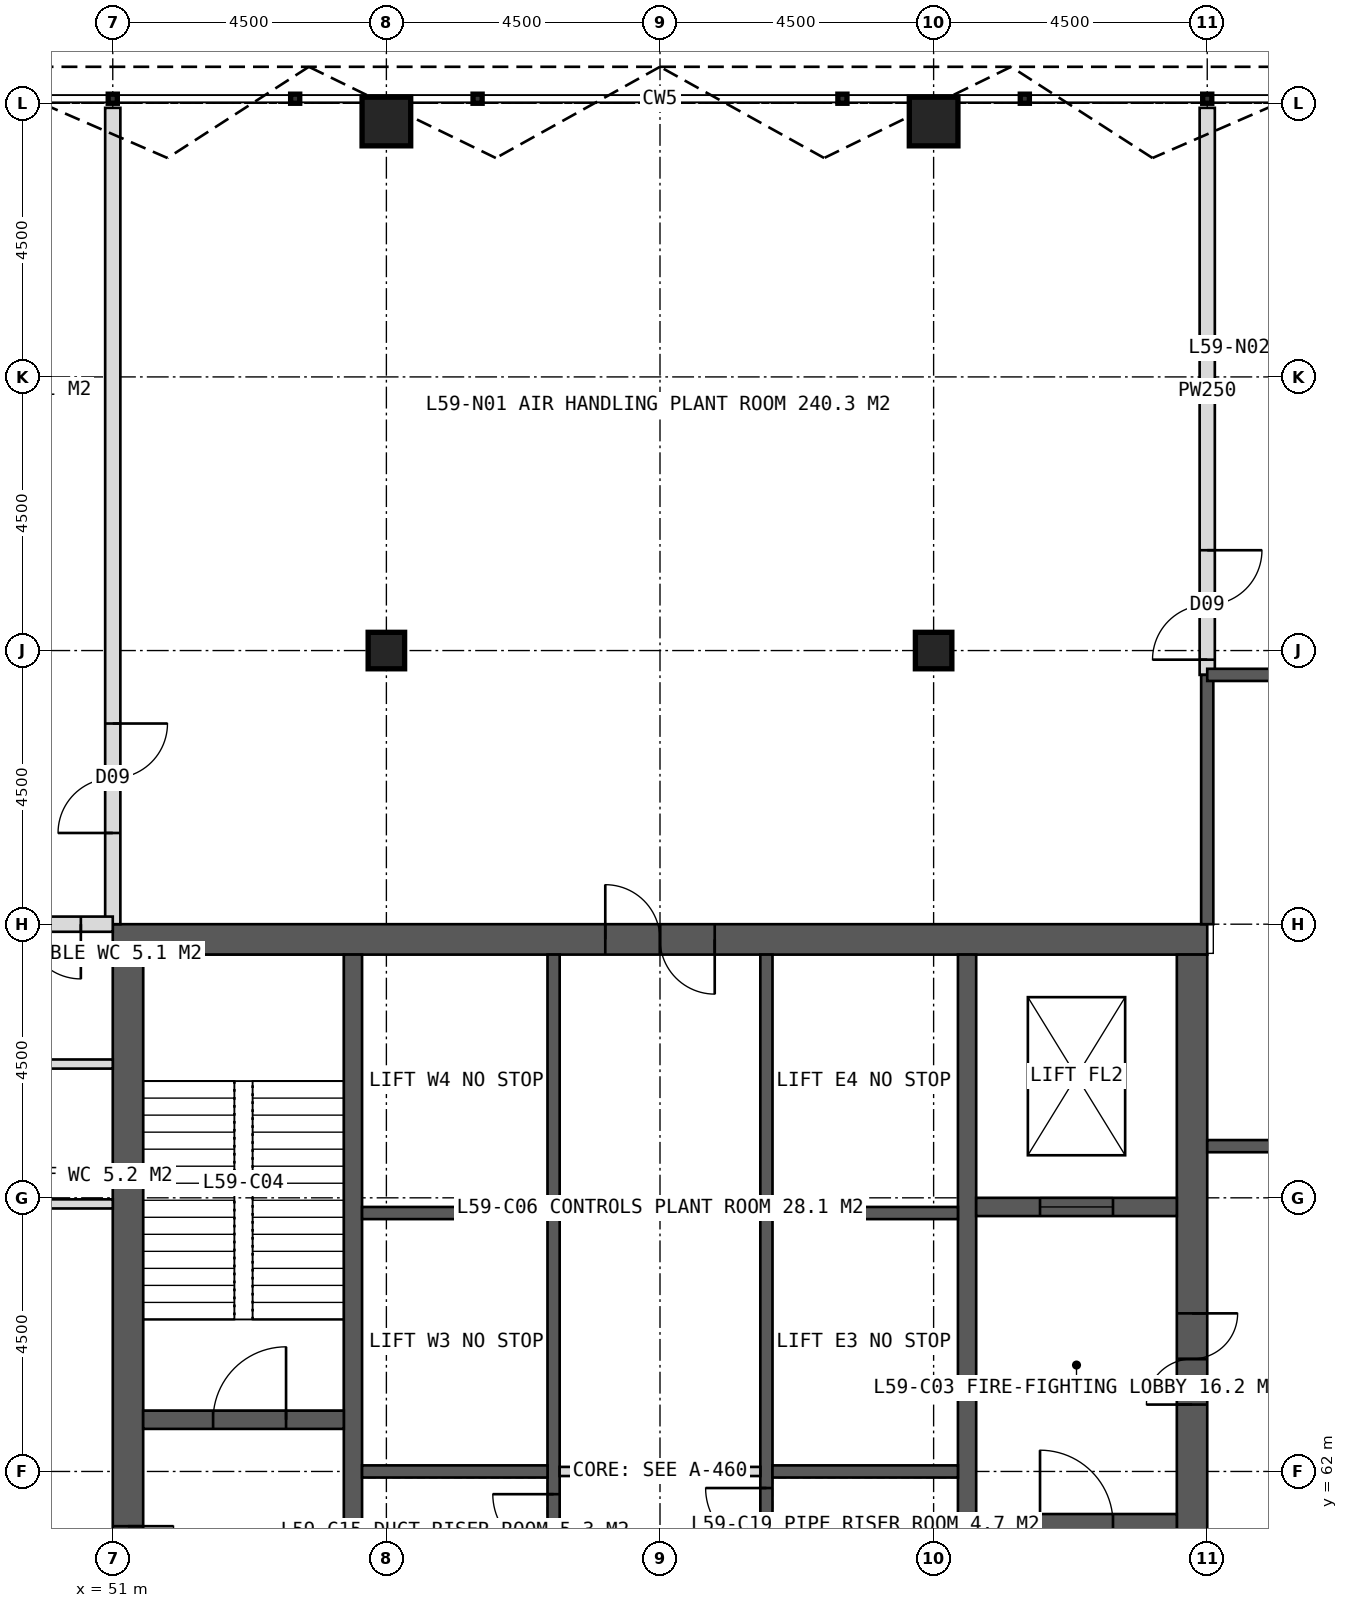
"""IFC4 building model, lengths in metres.
Left out: names, types, materials, properties, quantities, classifications, styles, units other than length and angle.
Written with IfcOpenShell. Run it as: python <this file> out.ifc"""

import sys

from ifc_helpers import new_model, si_unit, direction, frame, frame_2d, origin, origin_2d, place, context, subcontext, project, spatial, rectangle, hollow_rectangle, extrude, element, fill, save


model = new_model("IFC4")
c1 = context("Model", 3, precision=1e-05, world=origin(), true_north=direction((0.0, 1.0)))
c2 = subcontext(c1, "Body", "Model", "MODEL_VIEW")
j1 = project(units=[si_unit("LENGTHUNIT", "METRE"), si_unit("PLANEANGLEUNIT", "RADIAN")], contexts=[c1])
p1 = place(None, origin())
s1 = spatial("IfcSite", under=j1, at=p1, CompositionType="ELEMENT")
p2 = place(p1, origin())
s2 = spatial("IfcBuilding", under=s1, at=p2, CompositionType="ELEMENT")
p3 = place(p2, frame((0.0, 0.0, 245.0)))
s3 = spatial("IfcBuildingStorey", under=s2, at=p3, CompositionType="ELEMENT", Elevation=245.0)
p4 = place(p3, frame((51.0, 70.75, 0.0), z_axis=(0.0, 0.0, 1.0), x_axis=(1.0, 0.0, 0.0)))
e1 = element("IfcWall", 1, at=p4, inside=s3, PredefinedType="SHEAR", context=c2, shape_type="SweptSolid", body=[
    extrude(rectangle(XDim=18.0, YDim=0.5, at=frame_2d((9.0, 0.0))), origin(), (0.0, 0.0, 1.0), 5.0),
])
p5 = place(p4, frame((8.1, 0.0, 0.0)))
e2 = element("IfcOpeningElement", 2, at=p5, cuts=e1, PredefinedType="OPENING", context=c2, shape_type="SweptSolid", body=[
    extrude(rectangle(XDim=1.8, YDim=2.2, at=frame_2d((0.9, 1.1))), frame((0.0, 0.26, 0.0), z_axis=(0.0, -1.0, 0.0), x_axis=(1.0, 0.0, 0.0)), (0.0, 0.0, 1.0), 0.52),
])
p6 = place(p3, frame((51.25, 53.5, 0.0), z_axis=(0.0, 0.0, 1.0), x_axis=(0.0, 1.0, 0.0)))
e3 = element("IfcWall", 3, at=p6, inside=s3, PredefinedType="SHEAR", context=c2, shape_type="SweptSolid", body=[
    extrude(rectangle(XDim=17.0, YDim=0.5, at=frame_2d((8.5, 0.0))), origin(), (0.0, 0.0, 1.0), 5.0),
])
p7 = place(p6, frame((6.1, 0.0, 0.0)))
e4 = element("IfcOpeningElement", 4, at=p7, cuts=e3, PredefinedType="OPENING", context=c2, shape_type="SweptSolid", body=[
    extrude(rectangle(XDim=1.5, YDim=2.2, at=frame_2d((0.75, 1.1))), frame((0.0, 0.26, 0.0), z_axis=(0.0, -1.0, 0.0), x_axis=(1.0, 0.0, 0.0)), (0.0, 0.0, 1.0), 0.52),
])
p8 = place(p3, frame((68.75, 53.5, 0.0), z_axis=(0.0, 0.0, 1.0), x_axis=(0.0, 1.0, 0.0)))
e5 = element("IfcWall", 5, at=p8, inside=s3, PredefinedType="SHEAR", context=c2, shape_type="SweptSolid", body=[
    extrude(rectangle(XDim=17.0, YDim=0.5, at=frame_2d((8.5, 0.0))), origin(), (0.0, 0.0, 1.0), 5.0),
])
p9 = place(p8, frame((9.6, 0.0, 0.0)))
e6 = element("IfcOpeningElement", 6, at=p9, cuts=e5, PredefinedType="OPENING", context=c2, shape_type="SweptSolid", body=[
    extrude(rectangle(XDim=1.5, YDim=2.2, at=frame_2d((0.75, 1.1))), frame((0.0, 0.26, 0.0), z_axis=(0.0, -1.0, 0.0), x_axis=(1.0, 0.0, 0.0)), (0.0, 0.0, 1.0), 0.52),
])
for number, where, z_axis, x_axis in (
    (7, (54.95, 53.5, 0.0), (0.0, 0.0, 1.0), (0.0, 1.0, 0.0)),
    (8, (65.05, 53.5, 0.0), (0.0, 0.0, 1.0), (0.0, 1.0, 0.0)),
):
    element("IfcWall", number, at=place(p3, frame(where, z_axis=z_axis, x_axis=x_axis)), inside=s3, PredefinedType="SHEAR", context=c2, shape_type="SweptSolid", body=[
        extrude(rectangle(XDim=17.0, YDim=0.3, at=frame_2d((8.5, 0.0))), origin(), (0.0, 0.0, 1.0), 5.0),
    ])
p10 = place(p3, frame((58.25, 53.5, 0.0), z_axis=(0.0, 0.0, 1.0), x_axis=(0.0, 1.0, 0.0)))
e9 = element("IfcWall", 9, at=p10, inside=s3, PredefinedType="SHEAR", context=c2, shape_type="SweptSolid", body=[
    extrude(rectangle(XDim=17.0, YDim=0.2, at=frame_2d((8.5, 0.0))), origin(), (0.0, 0.0, 1.0), 5.0),
])
p11 = place(p10, frame((0.496, 0.0, 0.0)))
e10 = element("IfcOpeningElement", 10, at=p11, cuts=e9, PredefinedType="OPENING", context=c2, shape_type="SweptSolid", body=[
    extrude(rectangle(XDim=1.0, YDim=2.1, at=frame_2d((0.5, 1.05))), frame((0.0, 0.11, 0.0), z_axis=(0.0, -1.0, 0.0), x_axis=(1.0, 0.0, 0.0)), (0.0, 0.0, 1.0), 0.22),
])
p12 = place(p10, frame((2.646, 0.0, 0.0)))
e11 = element("IfcOpeningElement", 11, at=p12, cuts=e9, PredefinedType="OPENING", context=c2, shape_type="SweptSolid", body=[
    extrude(rectangle(XDim=1.0, YDim=2.1, at=frame_2d((0.5, 1.05))), frame((0.0, 0.11, 0.0), z_axis=(0.0, -1.0, 0.0), x_axis=(1.0, 0.0, 0.0)), (0.0, 0.0, 1.0), 0.22),
])
p13 = place(p10, frame((5.027, 0.0, 0.0)))
e12 = element("IfcOpeningElement", 12, at=p13, cuts=e9, PredefinedType="OPENING", context=c2, shape_type="SweptSolid", body=[
    extrude(rectangle(XDim=1.0, YDim=2.1, at=frame_2d((0.5, 1.05))), frame((0.0, 0.11, 0.0), z_axis=(0.0, -1.0, 0.0), x_axis=(1.0, 0.0, 0.0)), (0.0, 0.0, 1.0), 0.22),
])
p14 = place(p10, frame((7.126, 0.0, 0.0)))
e13 = element("IfcOpeningElement", 13, at=p14, cuts=e9, PredefinedType="OPENING", context=c2, shape_type="SweptSolid", body=[
    extrude(rectangle(XDim=1.0, YDim=2.1, at=frame_2d((0.5, 1.05))), frame((0.0, 0.11, 0.0), z_axis=(0.0, -1.0, 0.0), x_axis=(1.0, 0.0, 0.0)), (0.0, 0.0, 1.0), 0.22),
])
p15 = place(p3, frame((61.75, 53.5, 0.0), z_axis=(0.0, 0.0, 1.0), x_axis=(0.0, 1.0, 0.0)))
e14 = element("IfcWall", 14, at=p15, inside=s3, PredefinedType="SHEAR", context=c2, shape_type="SweptSolid", body=[
    extrude(rectangle(XDim=17.0, YDim=0.2, at=frame_2d((8.5, 0.0))), origin(), (0.0, 0.0, 1.0), 5.0),
])
p16 = place(p15, frame((0.393, 0.0, 0.0)))
e15 = element("IfcOpeningElement", 15, at=p16, cuts=e14, PredefinedType="OPENING", context=c2, shape_type="SweptSolid", body=[
    extrude(rectangle(XDim=1.0, YDim=2.1, at=frame_2d((0.5, 1.05))), frame((0.0, 0.11, 0.0), z_axis=(0.0, -1.0, 0.0), x_axis=(1.0, 0.0, 0.0)), (0.0, 0.0, 1.0), 0.22),
])
p17 = place(p15, frame((2.542, 0.0, 0.0)))
e16 = element("IfcOpeningElement", 16, at=p17, cuts=e14, PredefinedType="OPENING", context=c2, shape_type="SweptSolid", body=[
    extrude(rectangle(XDim=1.0, YDim=2.1, at=frame_2d((0.5, 1.05))), frame((0.0, 0.11, 0.0), z_axis=(0.0, -1.0, 0.0), x_axis=(1.0, 0.0, 0.0)), (0.0, 0.0, 1.0), 0.22),
])
p18 = place(p15, frame((5.127, 0.0, 0.0)))
e17 = element("IfcOpeningElement", 17, at=p18, cuts=e14, PredefinedType="OPENING", context=c2, shape_type="SweptSolid", body=[
    extrude(rectangle(XDim=1.0, YDim=2.1, at=frame_2d((0.5, 1.05))), frame((0.0, 0.11, 0.0), z_axis=(0.0, -1.0, 0.0), x_axis=(1.0, 0.0, 0.0)), (0.0, 0.0, 1.0), 0.22),
])
p19 = place(p15, frame((7.228, 0.0, 0.0)))
e18 = element("IfcOpeningElement", 18, at=p19, cuts=e14, PredefinedType="OPENING", context=c2, shape_type="SweptSolid", body=[
    extrude(rectangle(XDim=1.0, YDim=2.1, at=frame_2d((0.5, 1.05))), frame((0.0, 0.11, 0.0), z_axis=(0.0, -1.0, 0.0), x_axis=(1.0, 0.0, 0.0)), (0.0, 0.0, 1.0), 0.22),
])
for number, where, z_axis, x_axis in (
    (19, (55.1, 62.0, 0.0), (0.0, 0.0, 1.0), (1.0, 0.0, 0.0)),
    (20, (61.85, 62.0, 0.0), (0.0, 0.0, 1.0), (1.0, 0.0, 0.0)),
    (21, (55.1, 66.25, 0.0), (0.0, 0.0, 1.0), (1.0, 0.0, 0.0)),
    (22, (61.85, 66.25, 0.0), (0.0, 0.0, 1.0), (1.0, 0.0, 0.0)),
):
    element("IfcWall", number, at=place(p3, frame(where, z_axis=z_axis, x_axis=x_axis)), inside=s3, PredefinedType="SHEAR", context=c2, shape_type="SweptSolid", body=[
        extrude(rectangle(XDim=3.05, YDim=0.2, at=frame_2d((1.525, 0.0))), origin(), (0.0, 0.0, 1.0), 5.0),
    ])
p20 = place(p3, frame((51.5, 62.85, 0.0), z_axis=(0.0, 0.0, 1.0), x_axis=(1.0, 0.0, 0.0)))
e23 = element("IfcWall", 23, at=p20, inside=s3, PredefinedType="SHEAR", context=c2, shape_type="SweptSolid", body=[
    extrude(rectangle(XDim=3.3, YDim=0.3, at=frame_2d((1.65, 0.0))), origin(), (0.0, 0.0, 1.0), 5.0),
])
p21 = place(p20, frame((1.15, 0.0, 0.0)))
e24 = element("IfcOpeningElement", 24, at=p21, cuts=e23, PredefinedType="OPENING", context=c2, shape_type="SweptSolid", body=[
    extrude(rectangle(XDim=1.2, YDim=2.1, at=frame_2d((0.6, 1.05))), frame((0.0, 0.16, 0.0), z_axis=(0.0, -1.0, 0.0), x_axis=(1.0, 0.0, 0.0)), (0.0, 0.0, 1.0), 0.32),
])
p22 = place(p3, frame((65.2, 61.15, 0.0), z_axis=(0.0, 0.0, 1.0), x_axis=(1.0, 0.0, 0.0)))
e25 = element("IfcWall", 25, at=p22, inside=s3, PredefinedType="SHEAR", context=c2, shape_type="SweptSolid", body=[
    extrude(rectangle(XDim=3.3, YDim=0.3, at=frame_2d((1.65, 0.0))), origin(), (0.0, 0.0, 1.0), 5.0),
])
p23 = place(p22, frame((1.05, 0.0, 0.0)))
e26 = element("IfcOpeningElement", 26, at=p23, cuts=e25, PredefinedType="OPENING", context=c2, shape_type="SweptSolid", body=[
    extrude(rectangle(XDim=1.2, YDim=2.1, at=frame_2d((0.6, 1.05))), frame((0.0, 0.16, 0.0), z_axis=(0.0, -1.0, 0.0), x_axis=(1.0, 0.0, 0.0)), (0.0, 0.0, 1.0), 0.32),
])
p24 = place(p3, frame((65.2, 66.35, 0.0), z_axis=(0.0, 0.0, 1.0), x_axis=(1.0, 0.0, 0.0)))
e27 = element("IfcWall", 27, at=p24, inside=s3, PredefinedType="SHEAR", context=c2, shape_type="SweptSolid", body=[
    extrude(rectangle(XDim=3.3, YDim=0.3, at=frame_2d((1.65, 0.0))), origin(), (0.0, 0.0, 1.0), 5.0),
])
p25 = place(p24, frame((1.05, 0.0, 0.0)))
e28 = element("IfcOpeningElement", 28, at=p25, cuts=e27, PredefinedType="OPENING", context=c2, shape_type="SweptSolid", body=[
    extrude(rectangle(XDim=1.2, YDim=2.2, at=frame_2d((0.6, 1.1))), frame((0.0, 0.16, 0.0), z_axis=(0.0, -1.0, 0.0), x_axis=(1.0, 0.0, 0.0)), (0.0, 0.0, 1.0), 0.32),
])
for number, where, z_axis, x_axis in (
    (29, (55.5, 75.5, 0.0), (0.0, 0.0, 1.0), (1.0, 0.0, 0.0)),
    (30, (64.5, 75.5, 0.0), (0.0, 0.0, 1.0), (1.0, 0.0, 0.0)),
):
    element("IfcColumn", number, at=place(p3, frame(where, z_axis=z_axis, x_axis=x_axis)), inside=s3, PredefinedType="COLUMN", context=c2, shape_type="SweptSolid", body=[
        extrude(hollow_rectangle(XDim=0.6, YDim=0.6, WallThickness=0.04, at=origin_2d()), origin(), (0.0, 0.0, 1.0), 5.0),
    ])
for number, where, z_axis, x_axis in (
    (31, (55.5, 84.2, 0.0), (0.0, 0.0, 1.0), (1.0, 0.0, 0.0)),
    (32, (64.5, 84.2, 0.0), (0.0, 0.0, 1.0), (1.0, 0.0, 0.0)),
):
    element("IfcColumn", number, at=place(p3, frame(where, z_axis=z_axis, x_axis=x_axis)), inside=s3, PredefinedType="COLUMN", context=c2, shape_type="SweptSolid", body=[
        extrude(hollow_rectangle(XDim=0.8, YDim=0.8, WallThickness=0.08, at=origin_2d()), origin(), (0.0, 0.0, 1.0), 5.0),
    ])
p26 = place(p3, frame((69.0, 75.1, 0.0), z_axis=(0.0, 0.0, 1.0), x_axis=(0.0, 1.0, 0.0)))
e33 = element("IfcWall", 33, at=p26, inside=s3, PredefinedType="SOLIDWALL", context=c2, shape_type="SweptSolid", body=[
    extrude(rectangle(XDim=9.325, YDim=0.25, at=frame_2d((4.663, 0.0))), origin(), (0.0, 0.0, 1.0), 4.75),
])
p27 = place(p26, frame((0.25, 0.0, 0.0)))
e34 = element("IfcOpeningElement", 34, at=p27, cuts=e33, PredefinedType="OPENING", context=c2, shape_type="SweptSolid", body=[
    extrude(rectangle(XDim=1.8, YDim=2.2, at=frame_2d((0.9, 1.1))), frame((0.0, 0.135, 0.0), z_axis=(0.0, -1.0, 0.0), x_axis=(1.0, 0.0, 0.0)), (0.0, 0.0, 1.0), 0.27),
])
p28 = place(p3, frame((51.0, 71.0, 0.0), z_axis=(0.0, 0.0, 1.0), x_axis=(0.0, 1.0, 0.0)))
e35 = element("IfcWall", 35, at=p28, inside=s3, PredefinedType="SOLIDWALL", context=c2, shape_type="SweptSolid", body=[
    extrude(rectangle(XDim=13.425, YDim=0.25, at=frame_2d((6.712, 0.0))), origin(), (0.0, 0.0, 1.0), 4.75),
])
p29 = place(p28, frame((1.5, 0.0, 0.0)))
e36 = element("IfcOpeningElement", 36, at=p29, cuts=e35, PredefinedType="OPENING", context=c2, shape_type="SweptSolid", body=[
    extrude(rectangle(XDim=1.8, YDim=2.2, at=frame_2d((0.9, 1.1))), frame((0.0, 0.135, 0.0), z_axis=(0.0, -1.0, 0.0), x_axis=(1.0, 0.0, 0.0)), (0.0, 0.0, 1.0), 0.27),
])
p30 = place(p3, frame((51.0, 71.0, 0.0), z_axis=(0.0, 0.0, 1.0), x_axis=(-1.0, 0.0, 0.0)))
e37 = element("IfcWall", 37, at=p30, inside=s3, PredefinedType="SOLIDWALL", context=c2, shape_type="SweptSolid", body=[
    extrude(rectangle(XDim=13.425, YDim=0.25, at=frame_2d((6.712, 0.0))), origin(), (0.0, 0.0, 1.0), 4.75),
])
p31 = place(p30, frame((0.525, 0.0, 0.0)))
e38 = element("IfcOpeningElement", 38, at=p31, cuts=e37, PredefinedType="OPENING", context=c2, shape_type="SweptSolid", body=[
    extrude(rectangle(XDim=1.8, YDim=2.2, at=frame_2d((0.9, 1.1))), frame((0.0, 0.135, 0.0), z_axis=(0.0, -1.0, 0.0), x_axis=(1.0, 0.0, 0.0)), (0.0, 0.0, 1.0), 0.27),
])
p32 = place(p3, frame((51.0, 66.4, 0.0), z_axis=(0.0, 0.0, 1.0), x_axis=(-1.0, 0.0, 0.0)))
e39 = element("IfcWall", 39, at=p32, inside=s3, PredefinedType="PARTITIONING", context=c2, shape_type="SweptSolid", body=[
    extrude(rectangle(XDim=2.5, YDim=0.15, at=frame_2d((1.25, 0.0))), origin(), (0.0, 0.0, 1.0), 3.25),
])
p33 = place(p3, frame((51.0, 68.7, 0.0), z_axis=(0.0, 0.0, 1.0), x_axis=(-1.0, 0.0, 0.0)))
e40 = element("IfcWall", 40, at=p33, inside=s3, PredefinedType="PARTITIONING", context=c2, shape_type="SweptSolid", body=[
    extrude(rectangle(XDim=2.5, YDim=0.15, at=frame_2d((1.25, 0.0))), origin(), (0.0, 0.0, 1.0), 4.75),
])
p34 = place(p3, frame((58.35, 62.0, 0.0), z_axis=(0.0, 0.0, 1.0), x_axis=(1.0, 0.0, 0.0)))
e41 = element("IfcWall", 41, at=p34, inside=s3, PredefinedType="PARTITIONING", context=c2, shape_type="SweptSolid", body=[
    extrude(rectangle(XDim=3.3, YDim=0.15, at=frame_2d((1.65, 0.0))), origin(), (0.0, 0.0, 1.0), 4.75),
])
p35 = place(p3, frame((69.0, 71.0, 0.0), z_axis=(0.0, 0.0, 1.0), x_axis=(0.0, 1.0, 0.0)))
e42 = element("IfcWall", 42, at=p35, inside=s3, PredefinedType="SOLIDWALL", context=c2, shape_type="SweptSolid", body=[
    extrude(rectangle(XDim=4.1, YDim=0.2, at=frame_2d((2.05, 0.0))), origin(), (0.0, 0.0, 1.0), 4.75),
])
p36 = place(p3, frame((69.0, 67.35, 0.0), z_axis=(0.0, 0.0, 1.0), x_axis=(1.0, 0.0, 0.0)))
e43 = element("IfcWall", 43, at=p36, inside=s3, PredefinedType="SOLIDWALL", context=c2, shape_type="SweptSolid", body=[
    extrude(rectangle(XDim=3.5, YDim=0.2, at=frame_2d((1.75, 0.0))), origin(), (0.0, 0.0, 1.0), 4.75),
])
p37 = place(p3, frame((69.0, 75.1, 0.0), z_axis=(0.0, 0.0, 1.0), x_axis=(1.0, 0.0, 0.0)))
e44 = element("IfcWall", 44, at=p37, inside=s3, PredefinedType="SOLIDWALL", context=c2, shape_type="SweptSolid", body=[
    extrude(rectangle(XDim=4.0, YDim=0.2, at=frame_2d((2.0, 0.0))), origin(), (0.0, 0.0, 1.0), 4.75),
])
p38 = place(p27, origin())
e45 = element("IfcDoor", 45, at=p38, inside=s3, OperationType="DOUBLE_DOOR_SINGLE_SWING", PredefinedType="DOOR", context=c2, shape_type="SweptSolid", body=[
    extrude(rectangle(XDim=1.8, YDim=2.2, at=frame_2d((0.9, 1.1))), frame((0.0, 0.025, 0.0), z_axis=(0.0, -1.0, 0.0), x_axis=(1.0, 0.0, 0.0)), (0.0, 0.0, 1.0), 0.05),
])
fill(e34, e45)
p39 = place(p29, origin())
e46 = element("IfcDoor", 46, at=p39, inside=s3, OperationType="DOUBLE_DOOR_SINGLE_SWING", PredefinedType="DOOR", context=c2, shape_type="SweptSolid", body=[
    extrude(rectangle(XDim=1.8, YDim=2.2, at=frame_2d((0.9, 1.1))), frame((0.0, 0.025, 0.0), z_axis=(0.0, -1.0, 0.0), x_axis=(1.0, 0.0, 0.0)), (0.0, 0.0, 1.0), 0.05),
])
fill(e36, e46)
p40 = place(p31, origin())
e47 = element("IfcDoor", 47, at=p40, inside=s3, OperationType="DOUBLE_DOOR_SINGLE_SWING", PredefinedType="DOOR", context=c2, shape_type="SweptSolid", body=[
    extrude(rectangle(XDim=1.8, YDim=2.2, at=frame_2d((0.9, 1.1))), frame((0.0, 0.025, 0.0), z_axis=(0.0, -1.0, 0.0), x_axis=(1.0, 0.0, 0.0)), (0.0, 0.0, 1.0), 0.05),
])
fill(e38, e47)
p41 = place(p7, origin())
e48 = element("IfcDoor", 48, at=p41, inside=s3, OperationType="DOUBLE_DOOR_SINGLE_SWING", PredefinedType="DOOR", context=c2, shape_type="SweptSolid", body=[
    extrude(rectangle(XDim=1.5, YDim=2.2, at=frame_2d((0.75, 1.1))), frame((0.0, 0.025, 0.0), z_axis=(0.0, -1.0, 0.0), x_axis=(1.0, 0.0, 0.0)), (0.0, 0.0, 1.0), 0.05),
])
fill(e4, e48)
p42 = place(p9, origin())
e49 = element("IfcDoor", 49, at=p42, inside=s3, OperationType="DOUBLE_DOOR_SINGLE_SWING", PredefinedType="DOOR", context=c2, shape_type="SweptSolid", body=[
    extrude(rectangle(XDim=1.5, YDim=2.2, at=frame_2d((0.75, 1.1))), frame((0.0, 0.025, 0.0), z_axis=(0.0, -1.0, 0.0), x_axis=(1.0, 0.0, 0.0)), (0.0, 0.0, 1.0), 0.05),
])
fill(e6, e49)
p43 = place(p21, origin())
e50 = element("IfcDoor", 50, at=p43, inside=s3, OperationType="SINGLE_SWING_RIGHT", PredefinedType="DOOR", context=c2, shape_type="SweptSolid", body=[
    extrude(rectangle(XDim=1.2, YDim=2.1, at=frame_2d((0.6, 1.05))), frame((0.0, 0.025, 0.0), z_axis=(0.0, -1.0, 0.0), x_axis=(1.0, 0.0, 0.0)), (0.0, 0.0, 1.0), 0.05),
])
fill(e24, e50)
p44 = place(p23, origin())
e51 = element("IfcDoor", 51, at=p44, inside=s3, OperationType="SINGLE_SWING_LEFT", PredefinedType="DOOR", context=c2, shape_type="SweptSolid", body=[
    extrude(rectangle(XDim=1.2, YDim=2.1, at=frame_2d((0.6, 1.05))), frame((0.0, 0.025, 0.0), z_axis=(0.0, -1.0, 0.0), x_axis=(1.0, 0.0, 0.0)), (0.0, 0.0, 1.0), 0.05),
])
fill(e26, e51)
p45 = place(p25, origin())
e52 = element("IfcDoor", 52, at=p45, inside=s3, OperationType="SLIDING_TO_LEFT", PredefinedType="DOOR", context=c2, shape_type="SweptSolid", body=[
    extrude(rectangle(XDim=1.2, YDim=2.2, at=frame_2d((0.6, 1.1))), frame((0.0, 0.025, 0.0), z_axis=(0.0, -1.0, 0.0), x_axis=(1.0, 0.0, 0.0)), (0.0, 0.0, 1.0), 0.05),
])
fill(e28, e52)
p46 = place(p14, origin())
e53 = element("IfcDoor", 53, at=p46, inside=s3, OperationType="SINGLE_SWING_RIGHT", PredefinedType="DOOR", context=c2, shape_type="SweptSolid", body=[
    extrude(rectangle(XDim=1.0, YDim=2.1, at=frame_2d((0.5, 1.05))), frame((0.0, 0.025, 0.0), z_axis=(0.0, -1.0, 0.0), x_axis=(1.0, 0.0, 0.0)), (0.0, 0.0, 1.0), 0.05),
])
fill(e13, e53)
p47 = place(p19, origin())
e54 = element("IfcDoor", 54, at=p47, inside=s3, OperationType="SINGLE_SWING_RIGHT", PredefinedType="DOOR", context=c2, shape_type="SweptSolid", body=[
    extrude(rectangle(XDim=1.0, YDim=2.1, at=frame_2d((0.5, 1.05))), frame((0.0, 0.025, 0.0), z_axis=(0.0, -1.0, 0.0), x_axis=(1.0, 0.0, 0.0)), (0.0, 0.0, 1.0), 0.05),
])
fill(e18, e54)
p48 = place(p5, origin())
e55 = element("IfcDoor", 55, at=p48, inside=s3, OperationType="DOUBLE_DOOR_SINGLE_SWING", PredefinedType="DOOR", context=c2, shape_type="SweptSolid", body=[
    extrude(rectangle(XDim=1.8, YDim=2.2, at=frame_2d((0.9, 1.1))), frame((0.0, 0.025, 0.0), z_axis=(0.0, -1.0, 0.0), x_axis=(1.0, 0.0, 0.0)), (0.0, 0.0, 1.0), 0.05),
])
fill(e2, e55)
save(model, sys.argv[1])
